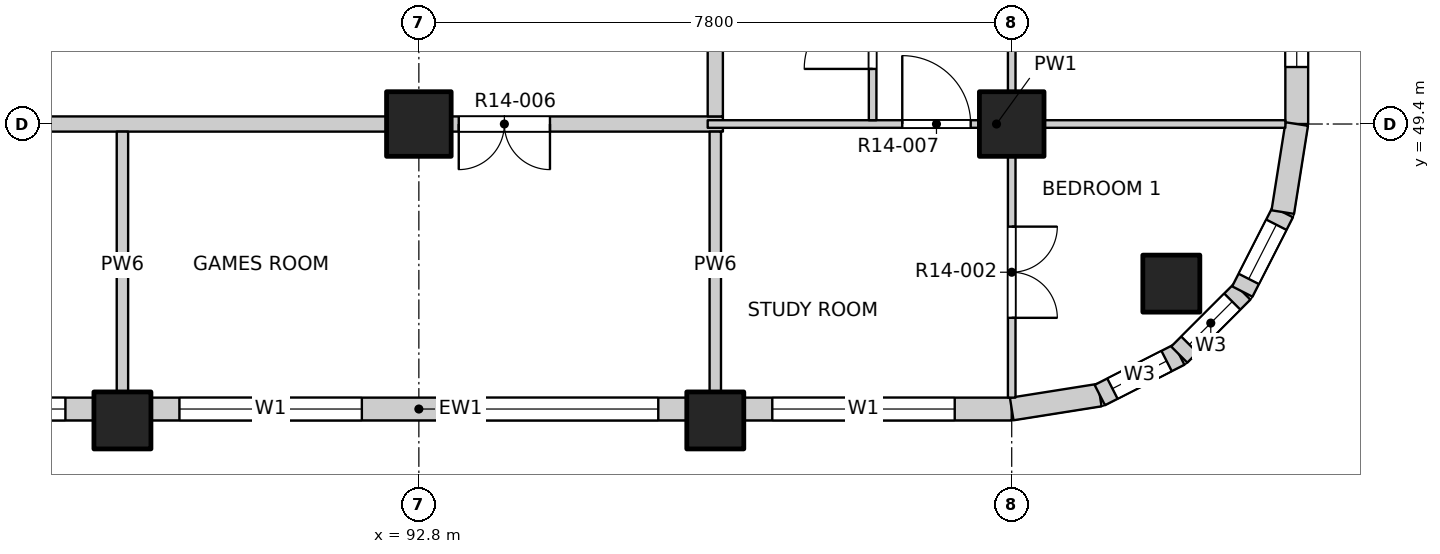
"""IFC4 building model, lengths in metres.
Left out: names, types, materials, properties, quantities, classifications, styles, units other than length and angle.
Written with IfcOpenShell. Run it as: python <this file> out.ifc"""

import sys

from ifc_helpers import new_model, si_unit, direction, frame, frame_2d, origin, origin_2d, place, context, subcontext, project, spatial, rectangle, extrude, element, fill, save


model = new_model("IFC4")
c1 = context("Model", 3, precision=1e-05, world=origin(), true_north=direction((0.0, 1.0)))
c2 = subcontext(c1, "Body", "Model", "MODEL_VIEW")
j1 = project(units=[si_unit("LENGTHUNIT", "METRE"), si_unit("PLANEANGLEUNIT", "RADIAN")], contexts=[c1])
p1 = place(None, origin())
s1 = spatial("IfcSite", under=j1, at=p1, CompositionType="ELEMENT")
p2 = place(p1, origin())
s2 = spatial("IfcBuilding", under=s1, at=p2, CompositionType="ELEMENT")
p3 = place(p2, frame((0.0, 0.0, 148.6)))
s3 = spatial("IfcBuildingStorey", under=s2, at=p3, CompositionType="ELEMENT", Elevation=148.6)
for number, where, z_axis, x_axis in (
    (1, (102.7, 47.3, -0.3), (0.0, 0.0, 1.0), (1.0, 0.0, 0.0)),
    (2, (88.9, 45.5, -0.3), (0.0, 0.0, 1.0), (1.0, 0.0, 0.0)),
    (3, (96.7, 45.5, -0.3), (0.0, 0.0, 1.0), (1.0, 0.0, 0.0)),
):
    element("IfcColumn", number, at=place(p3, frame(where, z_axis=z_axis, x_axis=x_axis)), inside=s3, PredefinedType="COLUMN", context=c2, shape_type="SweptSolid", body=[
        extrude(rectangle(XDim=0.75, YDim=0.75, at=origin_2d()), origin(), (0.0, 0.0, 1.0), 3.45),
    ])
for number, where, z_axis, x_axis in (
    (4, (92.8, 49.4, -0.3), (0.0, 0.0, 1.0), (1.0, 0.0, 0.0)),
    (5, (100.6, 49.4, -0.3), (0.0, 0.0, 1.0), (1.0, 0.0, 0.0)),
):
    element("IfcColumn", number, at=place(p3, frame(where, z_axis=z_axis, x_axis=x_axis)), inside=s3, PredefinedType="COLUMN", context=c2, shape_type="SweptSolid", body=[
        extrude(rectangle(XDim=0.85, YDim=0.85, at=origin_2d()), origin(), (0.0, 0.0, 1.0), 3.45),
    ])
p4 = place(p3, frame((81.475, 45.65, 0.0), z_axis=(0.0, 0.0, 1.0), x_axis=(1.0, 0.0, 0.0)))
e6 = element("IfcWall", 6, at=p4, inside=s3, PredefinedType="SOLIDWALL", context=c2, shape_type="SweptSolid", body=[
    extrude(rectangle(XDim=7.05, YDim=0.3, at=frame_2d((3.525, 0.0))), origin(), (0.0, 0.0, 1.0), 2.7),
])
p5 = place(p4, frame((0.375, 0.0, 0.9)))
e7 = element("IfcOpeningElement", 7, at=p5, cuts=e6, PredefinedType="OPENING", context=c2, shape_type="SweptSolid", body=[
    extrude(rectangle(XDim=2.4, YDim=1.8, at=frame_2d((1.2, 0.9))), frame((0.0, 0.16, 0.0), z_axis=(0.0, -1.0, 0.0), x_axis=(1.0, 0.0, 0.0)), (0.0, 0.0, 1.0), 0.32),
])
p6 = place(p4, frame((4.275, 0.0, 0.9)))
e8 = element("IfcOpeningElement", 8, at=p6, cuts=e6, PredefinedType="OPENING", context=c2, shape_type="SweptSolid", body=[
    extrude(rectangle(XDim=2.4, YDim=1.8, at=frame_2d((1.2, 0.9))), frame((0.0, 0.16, 0.0), z_axis=(0.0, -1.0, 0.0), x_axis=(1.0, 0.0, 0.0)), (0.0, 0.0, 1.0), 0.32),
])
p7 = place(p3, frame((89.275, 45.65, 0.0), z_axis=(0.0, 0.0, 1.0), x_axis=(1.0, 0.0, 0.0)))
e9 = element("IfcWall", 9, at=p7, inside=s3, PredefinedType="SOLIDWALL", context=c2, shape_type="SweptSolid", body=[
    extrude(rectangle(XDim=7.05, YDim=0.3, at=frame_2d((3.525, 0.0))), origin(), (0.0, 0.0, 1.0), 2.7),
])
p8 = place(p7, frame((0.375, 0.0, 0.9)))
e10 = element("IfcOpeningElement", 10, at=p8, cuts=e9, PredefinedType="OPENING", context=c2, shape_type="SweptSolid", body=[
    extrude(rectangle(XDim=2.4, YDim=1.8, at=frame_2d((1.2, 0.9))), frame((0.0, 0.16, 0.0), z_axis=(0.0, -1.0, 0.0), x_axis=(1.0, 0.0, 0.0)), (0.0, 0.0, 1.0), 0.32),
])
p9 = place(p7, frame((4.275, 0.0, 0.9)))
e11 = element("IfcOpeningElement", 11, at=p9, cuts=e9, PredefinedType="OPENING", context=c2, shape_type="SweptSolid", body=[
    extrude(rectangle(XDim=2.4, YDim=1.8, at=frame_2d((1.2, 0.9))), frame((0.0, 0.16, 0.0), z_axis=(0.0, -1.0, 0.0), x_axis=(1.0, 0.0, 0.0)), (0.0, 0.0, 1.0), 0.32),
])
p10 = place(p3, frame((97.075, 45.65, 0.0), z_axis=(0.0, 0.0, 1.0), x_axis=(1.0, 0.0, 0.0)))
e12 = element("IfcWall", 12, at=p10, inside=s3, PredefinedType="SOLIDWALL", context=c2, shape_type="SweptSolid", body=[
    extrude(rectangle(XDim=3.525, YDim=0.3, at=frame_2d((1.763, 0.0))), origin(), (0.0, 0.0, 1.0), 2.7),
])
p11 = place(p10, frame((0.375, 0.0, 0.9)))
e13 = element("IfcOpeningElement", 13, at=p11, cuts=e12, PredefinedType="OPENING", context=c2, shape_type="SweptSolid", body=[
    extrude(rectangle(XDim=2.4, YDim=1.8, at=frame_2d((1.2, 0.9))), frame((0.0, 0.16, 0.0), z_axis=(0.0, -1.0, 0.0), x_axis=(1.0, 0.0, 0.0)), (0.0, 0.0, 1.0), 0.32),
])
p12 = place(p3, frame((104.35, 49.4, 0.0), z_axis=(0.0, 0.0, 1.0), x_axis=(0.0, 1.0, 0.0)))
e14 = element("IfcWall", 14, at=p12, inside=s3, PredefinedType="SOLIDWALL", context=c2, shape_type="SweptSolid", body=[
    extrude(rectangle(XDim=3.525, YDim=0.3, at=frame_2d((1.763, 0.0))), origin(), (0.0, 0.0, 1.0), 2.7),
])
p13 = place(p12, frame((0.75, 0.0, 0.9)))
e15 = element("IfcOpeningElement", 15, at=p13, cuts=e14, PredefinedType="OPENING", context=c2, shape_type="SweptSolid", body=[
    extrude(rectangle(XDim=2.4, YDim=1.8, at=frame_2d((1.2, 0.9))), frame((0.0, 0.16, 0.0), z_axis=(0.0, -1.0, 0.0), x_axis=(1.0, 0.0, 0.0)), (0.0, 0.0, 1.0), 0.32),
])
p14 = place(p3, frame((100.6, 45.65, 0.0), z_axis=(0.0, 0.0, 1.0), x_axis=(0.987678452879, 0.156496880861, 0.0)))
e16 = element("IfcWall", 16, at=p14, inside=s3, PredefinedType="SOLIDWALL", context=c2, shape_type="SweptSolid", body=[
    extrude(rectangle(XDim=1.173, YDim=0.3, at=frame_2d((0.586, 0.0))), origin(), (0.0, 0.0, 1.0), 2.7),
])
p15 = place(p3, frame((101.759, 45.833, 0.0), z_axis=(0.0, 0.0, 1.0), x_axis=(0.890988677504, 0.454025524128, 0.0)))
e17 = element("IfcWall", 17, at=p15, inside=s3, PredefinedType="SOLIDWALL", context=c2, shape_type="SweptSolid", body=[
    extrude(rectangle(XDim=1.173, YDim=0.3, at=frame_2d((0.587, 0.0))), origin(), (0.0, 0.0, 1.0), 2.7),
])
p16 = place(p15, frame((0.187, 0.0, 0.9)))
e18 = element("IfcOpeningElement", 18, at=p16, cuts=e17, PredefinedType="OPENING", context=c2, shape_type="SweptSolid", body=[
    extrude(rectangle(XDim=0.8, YDim=1.2, at=frame_2d((0.4, 0.6))), frame((0.0, 0.16, 0.0), z_axis=(0.0, -1.0, 0.0), x_axis=(1.0, 0.0, 0.0)), (0.0, 0.0, 1.0), 0.32),
])
p17 = place(p3, frame((102.804, 46.366, 0.0), z_axis=(0.0, 0.0, 1.0), x_axis=(0.707106781187, 0.707106781187, 0.0)))
e19 = element("IfcWall", 19, at=p17, inside=s3, PredefinedType="SOLIDWALL", context=c2, shape_type="SweptSolid", body=[
    extrude(rectangle(XDim=1.173, YDim=0.3, at=frame_2d((0.586, 0.0))), origin(), (0.0, 0.0, 1.0), 2.7),
])
p18 = place(p17, frame((0.187, 0.0, 0.9)))
e20 = element("IfcOpeningElement", 20, at=p18, cuts=e19, PredefinedType="OPENING", context=c2, shape_type="SweptSolid", body=[
    extrude(rectangle(XDim=0.8, YDim=1.2, at=frame_2d((0.4, 0.6))), frame((0.0, 0.16, 0.0), z_axis=(0.0, -1.0, 0.0), x_axis=(1.0, 0.0, 0.0)), (0.0, 0.0, 1.0), 0.32),
])
p19 = place(p3, frame((103.634, 47.196, 0.0), z_axis=(0.0, 0.0, 1.0), x_axis=(0.454025524128, 0.890988677504, 0.0)))
e21 = element("IfcWall", 21, at=p19, inside=s3, PredefinedType="SOLIDWALL", context=c2, shape_type="SweptSolid", body=[
    extrude(rectangle(XDim=1.173, YDim=0.3, at=frame_2d((0.587, 0.0))), origin(), (0.0, 0.0, 1.0), 2.7),
])
p20 = place(p19, frame((0.187, 0.0, 0.9)))
e22 = element("IfcOpeningElement", 22, at=p20, cuts=e21, PredefinedType="OPENING", context=c2, shape_type="SweptSolid", body=[
    extrude(rectangle(XDim=0.8, YDim=1.2, at=frame_2d((0.4, 0.6))), frame((0.0, 0.16, 0.0), z_axis=(0.0, -1.0, 0.0), x_axis=(1.0, 0.0, 0.0)), (0.0, 0.0, 1.0), 0.32),
])
p21 = place(p3, frame((104.167, 48.241, 0.0), z_axis=(0.0, 0.0, 1.0), x_axis=(0.156496880861, 0.987678452879, 0.0)))
e23 = element("IfcWall", 23, at=p21, inside=s3, PredefinedType="SOLIDWALL", context=c2, shape_type="SweptSolid", body=[
    extrude(rectangle(XDim=1.173, YDim=0.3, at=frame_2d((0.586, 0.0))), origin(), (0.0, 0.0, 1.0), 2.7),
])
p22 = place(p3, frame((73.2, 49.4, 0.0), z_axis=(0.0, 0.0, 1.0), x_axis=(1.0, 0.0, 0.0)))
e24 = element("IfcWall", 24, at=p22, inside=s3, PredefinedType="PARTITIONING", context=c2, shape_type="SweptSolid", body=[
    extrude(rectangle(XDim=23.6, YDim=0.2, at=frame_2d((11.8, 0.0))), origin(), (0.0, 0.0, 1.0), 3.15),
])
p23 = place(p22, frame((4.525, 0.0, 0.0)))
e25 = element("IfcOpeningElement", 25, at=p23, cuts=e24, PredefinedType="OPENING", context=c2, shape_type="SweptSolid", body=[
    extrude(rectangle(XDim=1.2, YDim=2.1, at=frame_2d((0.6, 1.05))), frame((0.0, 0.11, 0.0), z_axis=(0.0, -1.0, 0.0), x_axis=(1.0, 0.0, 0.0)), (0.0, 0.0, 1.0), 0.22),
])
p24 = place(p22, frame((12.325, 0.0, 0.0)))
e26 = element("IfcOpeningElement", 26, at=p24, cuts=e24, PredefinedType="OPENING", context=c2, shape_type="SweptSolid", body=[
    extrude(rectangle(XDim=1.2, YDim=2.1, at=frame_2d((0.6, 1.05))), frame((0.0, 0.11, 0.0), z_axis=(0.0, -1.0, 0.0), x_axis=(1.0, 0.0, 0.0)), (0.0, 0.0, 1.0), 0.22),
])
p25 = place(p22, frame((20.125, 0.0, 0.0)))
e27 = element("IfcOpeningElement", 27, at=p25, cuts=e24, PredefinedType="OPENING", context=c2, shape_type="SweptSolid", body=[
    extrude(rectangle(XDim=1.2, YDim=2.1, at=frame_2d((0.6, 1.05))), frame((0.0, 0.11, 0.0), z_axis=(0.0, -1.0, 0.0), x_axis=(1.0, 0.0, 0.0)), (0.0, 0.0, 1.0), 0.22),
])
p26 = place(p3, frame((96.6, 49.4, 0.0), z_axis=(0.0, 0.0, 1.0), x_axis=(1.0, 0.0, 0.0)))
e28 = element("IfcWall", 28, at=p26, inside=s3, PredefinedType="PARTITIONING", context=c2, shape_type="SweptSolid", body=[
    extrude(rectangle(XDim=7.6, YDim=0.1, at=frame_2d((3.8, 0.0))), origin(), (0.0, 0.0, 1.0), 3.15),
])
p27 = place(p26, frame((2.56, 0.0, 0.0)))
e29 = element("IfcOpeningElement", 29, at=p27, cuts=e28, PredefinedType="OPENING", context=c2, shape_type="SweptSolid", body=[
    extrude(rectangle(XDim=0.9, YDim=2.1, at=frame_2d((0.45, 1.05))), frame((0.0, 0.06, 0.0), z_axis=(0.0, -1.0, 0.0), x_axis=(1.0, 0.0, 0.0)), (0.0, 0.0, 1.0), 0.12),
])
for number, where, z_axis, x_axis in (
    (30, (88.9, 45.8, 0.0), (0.0, 0.0, 1.0), (0.0, 1.0, 0.0)),
    (31, (96.7, 45.8, 0.0), (0.0, 0.0, 1.0), (0.0, 1.0, 0.0)),
):
    element("IfcWall", number, at=place(p3, frame(where, z_axis=z_axis, x_axis=x_axis)), inside=s3, PredefinedType="PARTITIONING", context=c2, shape_type="SweptSolid", body=[
        extrude(rectangle(XDim=3.5, YDim=0.15, at=frame_2d((1.75, 0.0))), origin(), (0.0, 0.0, 1.0), 3.15),
    ])
p28 = place(p3, frame((96.7, 49.5, 0.0), z_axis=(0.0, 0.0, 1.0), x_axis=(0.0, 1.0, 0.0)))
e32 = element("IfcWall", 32, at=p28, inside=s3, PredefinedType="PARTITIONING", context=c2, shape_type="SweptSolid", body=[
    extrude(rectangle(XDim=34.7, YDim=0.2, at=frame_2d((17.35, 0.0))), origin(), (0.0, 0.0, 1.0), 3.15),
])
p29 = place(p28, frame((3.225, 0.0, 0.0)))
e33 = element("IfcOpeningElement", 33, at=p29, cuts=e32, PredefinedType="OPENING", context=c2, shape_type="SweptSolid", body=[
    extrude(rectangle(XDim=1.0, YDim=2.1, at=frame_2d((0.5, 1.05))), frame((0.0, 0.11, 0.0), z_axis=(0.0, -1.0, 0.0), x_axis=(1.0, 0.0, 0.0)), (0.0, 0.0, 1.0), 0.22),
])
p30 = place(p28, frame((19.775, 0.0, 0.0)))
e34 = element("IfcOpeningElement", 34, at=p30, cuts=e32, PredefinedType="OPENING", context=c2, shape_type="SweptSolid", body=[
    extrude(rectangle(XDim=1.0, YDim=2.1, at=frame_2d((0.5, 1.05))), frame((0.0, 0.11, 0.0), z_axis=(0.0, -1.0, 0.0), x_axis=(1.0, 0.0, 0.0)), (0.0, 0.0, 1.0), 0.22),
])
p31 = place(p28, frame((24.125, 0.0, 0.0)))
e35 = element("IfcOpeningElement", 35, at=p31, cuts=e32, PredefinedType="OPENING", context=c2, shape_type="SweptSolid", body=[
    extrude(rectangle(XDim=1.0, YDim=2.1, at=frame_2d((0.5, 1.05))), frame((0.0, 0.11, 0.0), z_axis=(0.0, -1.0, 0.0), x_axis=(1.0, 0.0, 0.0)), (0.0, 0.0, 1.0), 0.22),
])
p32 = place(p3, frame((98.77, 49.45, 0.0), z_axis=(0.0, 0.0, 1.0), x_axis=(0.0, 1.0, 0.0)))
e36 = element("IfcWall", 36, at=p32, inside=s3, PredefinedType="PARTITIONING", context=c2, shape_type="SweptSolid", body=[
    extrude(rectangle(XDim=4.4, YDim=0.1, at=frame_2d((2.2, 0.0))), origin(), (0.0, 0.0, 1.0), 3.15),
])
p33 = place(p32, frame((0.675, 0.0, 0.0)))
e37 = element("IfcOpeningElement", 37, at=p33, cuts=e36, PredefinedType="OPENING", context=c2, shape_type="SweptSolid", body=[
    extrude(rectangle(XDim=0.9, YDim=2.1, at=frame_2d((0.45, 1.05))), frame((0.0, 0.06, 0.0), z_axis=(0.0, -1.0, 0.0), x_axis=(1.0, 0.0, 0.0)), (0.0, 0.0, 1.0), 0.12),
])
p34 = place(p32, frame((2.975, 0.0, 0.0)))
e38 = element("IfcOpeningElement", 38, at=p34, cuts=e36, PredefinedType="OPENING", context=c2, shape_type="SweptSolid", body=[
    extrude(rectangle(XDim=0.8, YDim=2.1, at=frame_2d((0.4, 1.05))), frame((0.0, 0.06, 0.0), z_axis=(0.0, -1.0, 0.0), x_axis=(1.0, 0.0, 0.0)), (0.0, 0.0, 1.0), 0.12),
])
p35 = place(p3, frame((100.6, 45.8, 0.0), z_axis=(0.0, 0.0, 1.0), x_axis=(0.0, 1.0, 0.0)))
e39 = element("IfcWall", 39, at=p35, inside=s3, PredefinedType="PARTITIONING", context=c2, shape_type="SweptSolid", body=[
    extrude(rectangle(XDim=38.4, YDim=0.1, at=frame_2d((19.2, 0.0))), origin(), (0.0, 0.0, 1.0), 3.15),
])
p36 = place(p35, frame((1.05, 0.0, 0.0)))
e40 = element("IfcOpeningElement", 40, at=p36, cuts=e39, PredefinedType="OPENING", context=c2, shape_type="SweptSolid", body=[
    extrude(rectangle(XDim=1.2, YDim=2.1, at=frame_2d((0.6, 1.05))), frame((0.0, 0.06, 0.0), z_axis=(0.0, -1.0, 0.0), x_axis=(1.0, 0.0, 0.0)), (0.0, 0.0, 1.0), 0.12),
])
p37 = place(p35, frame((5.1, 0.0, 0.0)))
e41 = element("IfcOpeningElement", 41, at=p37, cuts=e39, PredefinedType="OPENING", context=c2, shape_type="SweptSolid", body=[
    extrude(rectangle(XDim=0.9, YDim=2.1, at=frame_2d((0.45, 1.05))), frame((0.0, 0.06, 0.0), z_axis=(0.0, -1.0, 0.0), x_axis=(1.0, 0.0, 0.0)), (0.0, 0.0, 1.0), 0.12),
])
p38 = place(p35, frame((9.0, 0.0, 0.0)))
e42 = element("IfcOpeningElement", 42, at=p38, cuts=e39, PredefinedType="OPENING", context=c2, shape_type="SweptSolid", body=[
    extrude(rectangle(XDim=0.9, YDim=2.1, at=frame_2d((0.45, 1.05))), frame((0.0, 0.06, 0.0), z_axis=(0.0, -1.0, 0.0), x_axis=(1.0, 0.0, 0.0)), (0.0, 0.0, 1.0), 0.12),
])
p39 = place(p35, frame((12.9, 0.0, 0.0)))
e43 = element("IfcOpeningElement", 43, at=p39, cuts=e39, PredefinedType="OPENING", context=c2, shape_type="SweptSolid", body=[
    extrude(rectangle(XDim=0.9, YDim=2.1, at=frame_2d((0.45, 1.05))), frame((0.0, 0.06, 0.0), z_axis=(0.0, -1.0, 0.0), x_axis=(1.0, 0.0, 0.0)), (0.0, 0.0, 1.0), 0.12),
])
p40 = place(p35, frame((16.8, 0.0, 0.0)))
e44 = element("IfcOpeningElement", 44, at=p40, cuts=e39, PredefinedType="OPENING", context=c2, shape_type="SweptSolid", body=[
    extrude(rectangle(XDim=0.9, YDim=2.1, at=frame_2d((0.45, 1.05))), frame((0.0, 0.06, 0.0), z_axis=(0.0, -1.0, 0.0), x_axis=(1.0, 0.0, 0.0)), (0.0, 0.0, 1.0), 0.12),
])
p41 = place(p35, frame((20.7, 0.0, 0.0)))
e45 = element("IfcOpeningElement", 45, at=p41, cuts=e39, PredefinedType="OPENING", context=c2, shape_type="SweptSolid", body=[
    extrude(rectangle(XDim=0.9, YDim=2.1, at=frame_2d((0.45, 1.05))), frame((0.0, 0.06, 0.0), z_axis=(0.0, -1.0, 0.0), x_axis=(1.0, 0.0, 0.0)), (0.0, 0.0, 1.0), 0.12),
])
p42 = place(p35, frame((24.6, 0.0, 0.0)))
e46 = element("IfcOpeningElement", 46, at=p42, cuts=e39, PredefinedType="OPENING", context=c2, shape_type="SweptSolid", body=[
    extrude(rectangle(XDim=0.9, YDim=2.1, at=frame_2d((0.45, 1.05))), frame((0.0, 0.06, 0.0), z_axis=(0.0, -1.0, 0.0), x_axis=(1.0, 0.0, 0.0)), (0.0, 0.0, 1.0), 0.12),
])
p43 = place(p35, frame((28.5, 0.0, 0.0)))
e47 = element("IfcOpeningElement", 47, at=p43, cuts=e39, PredefinedType="OPENING", context=c2, shape_type="SweptSolid", body=[
    extrude(rectangle(XDim=0.9, YDim=2.1, at=frame_2d((0.45, 1.05))), frame((0.0, 0.06, 0.0), z_axis=(0.0, -1.0, 0.0), x_axis=(1.0, 0.0, 0.0)), (0.0, 0.0, 1.0), 0.12),
])
p44 = place(p35, frame((32.4, 0.0, 0.0)))
e48 = element("IfcOpeningElement", 48, at=p44, cuts=e39, PredefinedType="OPENING", context=c2, shape_type="SweptSolid", body=[
    extrude(rectangle(XDim=0.9, YDim=2.1, at=frame_2d((0.45, 1.05))), frame((0.0, 0.06, 0.0), z_axis=(0.0, -1.0, 0.0), x_axis=(1.0, 0.0, 0.0)), (0.0, 0.0, 1.0), 0.12),
])
p45 = place(p35, frame((36.15, 0.0, 0.0)))
e49 = element("IfcOpeningElement", 49, at=p45, cuts=e39, PredefinedType="OPENING", context=c2, shape_type="SweptSolid", body=[
    extrude(rectangle(XDim=1.2, YDim=2.1, at=frame_2d((0.6, 1.05))), frame((0.0, 0.06, 0.0), z_axis=(0.0, -1.0, 0.0), x_axis=(1.0, 0.0, 0.0)), (0.0, 0.0, 1.0), 0.12),
])
p46 = place(p6, origin())
e50 = element("IfcWindow", 50, at=p46, inside=s3, PartitioningType="DOUBLE_PANEL_VERTICAL", PredefinedType="WINDOW", context=c2, shape_type="SweptSolid", body=[
    extrude(rectangle(XDim=2.4, YDim=1.8, at=frame_2d((1.2, 0.9))), frame((0.0, 0.03, 0.0), z_axis=(0.0, -1.0, 0.0), x_axis=(1.0, 0.0, 0.0)), (0.0, 0.0, 1.0), 0.06),
])
fill(e8, e50)
p47 = place(p8, origin())
e51 = element("IfcWindow", 51, at=p47, inside=s3, PartitioningType="DOUBLE_PANEL_VERTICAL", PredefinedType="WINDOW", context=c2, shape_type="SweptSolid", body=[
    extrude(rectangle(XDim=2.4, YDim=1.8, at=frame_2d((1.2, 0.9))), frame((0.0, 0.03, 0.0), z_axis=(0.0, -1.0, 0.0), x_axis=(1.0, 0.0, 0.0)), (0.0, 0.0, 1.0), 0.06),
])
fill(e10, e51)
p48 = place(p9, origin())
e52 = element("IfcWindow", 52, at=p48, inside=s3, PartitioningType="DOUBLE_PANEL_VERTICAL", PredefinedType="WINDOW", context=c2, shape_type="SweptSolid", body=[
    extrude(rectangle(XDim=2.4, YDim=1.8, at=frame_2d((1.2, 0.9))), frame((0.0, 0.03, 0.0), z_axis=(0.0, -1.0, 0.0), x_axis=(1.0, 0.0, 0.0)), (0.0, 0.0, 1.0), 0.06),
])
fill(e11, e52)
p49 = place(p11, origin())
e53 = element("IfcWindow", 53, at=p49, inside=s3, PartitioningType="DOUBLE_PANEL_VERTICAL", PredefinedType="WINDOW", context=c2, shape_type="SweptSolid", body=[
    extrude(rectangle(XDim=2.4, YDim=1.8, at=frame_2d((1.2, 0.9))), frame((0.0, 0.03, 0.0), z_axis=(0.0, -1.0, 0.0), x_axis=(1.0, 0.0, 0.0)), (0.0, 0.0, 1.0), 0.06),
])
fill(e13, e53)
p50 = place(p13, origin())
e54 = element("IfcWindow", 54, at=p50, inside=s3, PartitioningType="DOUBLE_PANEL_VERTICAL", PredefinedType="WINDOW", context=c2, shape_type="SweptSolid", body=[
    extrude(rectangle(XDim=2.4, YDim=1.8, at=frame_2d((1.2, 0.9))), frame((0.0, 0.03, 0.0), z_axis=(0.0, -1.0, 0.0), x_axis=(1.0, 0.0, 0.0)), (0.0, 0.0, 1.0), 0.06),
])
fill(e15, e54)
p51 = place(p16, origin())
e55 = element("IfcWindow", 55, at=p51, inside=s3, PartitioningType="SINGLE_PANEL", PredefinedType="WINDOW", context=c2, shape_type="SweptSolid", body=[
    extrude(rectangle(XDim=0.8, YDim=1.2, at=frame_2d((0.4, 0.6))), frame((0.0, 0.03, 0.0), z_axis=(0.0, -1.0, 0.0), x_axis=(1.0, 0.0, 0.0)), (0.0, 0.0, 1.0), 0.06),
])
fill(e18, e55)
p52 = place(p18, origin())
e56 = element("IfcWindow", 56, at=p52, inside=s3, PartitioningType="SINGLE_PANEL", PredefinedType="WINDOW", context=c2, shape_type="SweptSolid", body=[
    extrude(rectangle(XDim=0.8, YDim=1.2, at=frame_2d((0.4, 0.6))), frame((0.0, 0.03, 0.0), z_axis=(0.0, -1.0, 0.0), x_axis=(1.0, 0.0, 0.0)), (0.0, 0.0, 1.0), 0.06),
])
fill(e20, e56)
p53 = place(p20, origin())
e57 = element("IfcWindow", 57, at=p53, inside=s3, PartitioningType="SINGLE_PANEL", PredefinedType="WINDOW", context=c2, shape_type="SweptSolid", body=[
    extrude(rectangle(XDim=0.8, YDim=1.2, at=frame_2d((0.4, 0.6))), frame((0.0, 0.03, 0.0), z_axis=(0.0, -1.0, 0.0), x_axis=(1.0, 0.0, 0.0)), (0.0, 0.0, 1.0), 0.06),
])
fill(e22, e57)
p54 = place(p36, origin())
e58 = element("IfcDoor", 58, at=p54, inside=s3, OperationType="DOUBLE_DOOR_SINGLE_SWING", PredefinedType="DOOR", context=c2, shape_type="SweptSolid", body=[
    extrude(rectangle(XDim=1.2, YDim=2.1, at=frame_2d((0.6, 1.05))), frame((0.0, 0.025, 0.0), z_axis=(0.0, -1.0, 0.0), x_axis=(1.0, 0.0, 0.0)), (0.0, 0.0, 1.0), 0.05),
])
fill(e40, e58)
p55 = place(p25, origin())
e59 = element("IfcDoor", 59, at=p55, inside=s3, OperationType="DOUBLE_DOOR_SINGLE_SWING", PredefinedType="DOOR", context=c2, shape_type="SweptSolid", body=[
    extrude(rectangle(XDim=1.2, YDim=2.1, at=frame_2d((0.6, 1.05))), frame((0.0, 0.025, 0.0), z_axis=(0.0, -1.0, 0.0), x_axis=(1.0, 0.0, 0.0)), (0.0, 0.0, 1.0), 0.05),
])
fill(e27, e59)
p56 = place(p27, origin())
e60 = element("IfcDoor", 60, at=p56, inside=s3, OperationType="SINGLE_SWING_LEFT", PredefinedType="DOOR", context=c2, shape_type="SweptSolid", body=[
    extrude(rectangle(XDim=0.9, YDim=2.1, at=frame_2d((0.45, 1.05))), frame((0.0, 0.025, 0.0), z_axis=(0.0, -1.0, 0.0), x_axis=(1.0, 0.0, 0.0)), (0.0, 0.0, 1.0), 0.05),
])
fill(e29, e60)
p57 = place(p33, origin())
e61 = element("IfcDoor", 61, at=p57, inside=s3, OperationType="SINGLE_SWING_LEFT", PredefinedType="DOOR", context=c2, shape_type="SweptSolid", body=[
    extrude(rectangle(XDim=0.9, YDim=2.1, at=frame_2d((0.45, 1.05))), frame((0.0, 0.025, 0.0), z_axis=(0.0, -1.0, 0.0), x_axis=(1.0, 0.0, 0.0)), (0.0, 0.0, 1.0), 0.05),
])
fill(e37, e61)
save(model, sys.argv[1])
